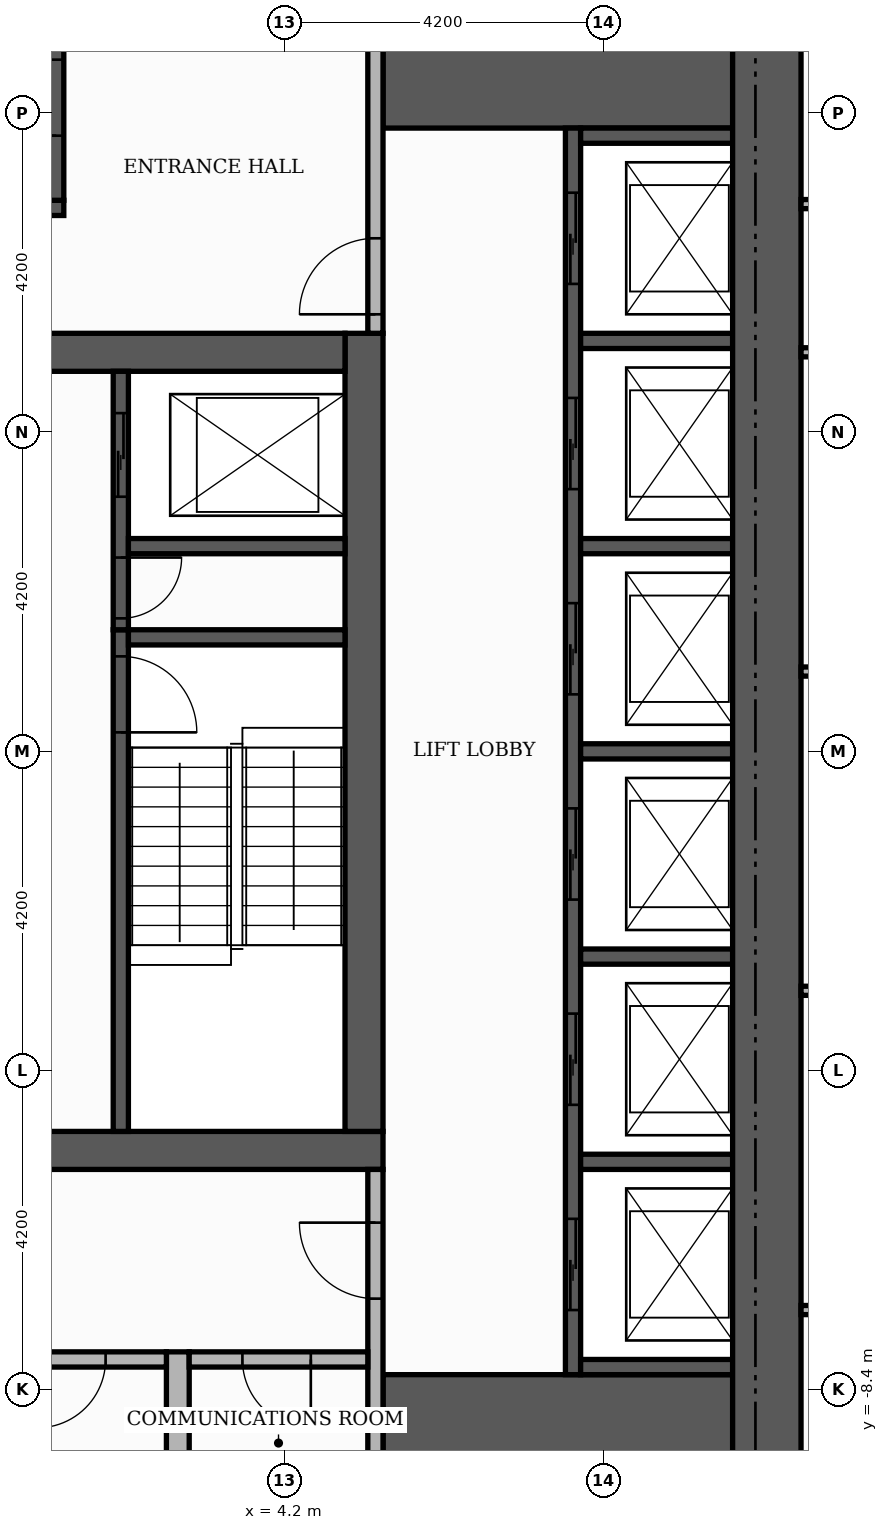
"""IFC4 building model, lengths in metres.
Left out: names, types, materials, properties, quantities, classifications, styles, units other than length and angle.
Written with IfcOpenShell. Run it as: python <this file> out.ifc"""

import sys

from ifc_helpers import new_model, si_unit, direction, frame, frame_2d, origin, place, context, subcontext, project, spatial, rectangle, extrude, element, fill, save


model = new_model("IFC4")
c1 = context("Model", 3, precision=1e-05, world=origin(), true_north=direction((0.0, 1.0)))
c2 = subcontext(c1, "Body", "Model", "MODEL_VIEW")
j1 = project(units=[si_unit("LENGTHUNIT", "METRE"), si_unit("PLANEANGLEUNIT", "RADIAN")], contexts=[c1])
p1 = place(None, origin())
s1 = spatial("IfcSite", under=j1, at=p1, CompositionType="ELEMENT")
p2 = place(p1, origin())
s2 = spatial("IfcBuilding", under=s1, at=p2, CompositionType="ELEMENT")
p3 = place(p2, frame((0.0, 0.0, 283.5)))
s3 = spatial("IfcBuildingStorey", under=s2, at=p3, CompositionType="ELEMENT", Elevation=283.5)
p4 = place(p3, frame((-5.5, -5.25, 0.0), z_axis=(0.0, 0.0, 1.0), x_axis=(1.0, 0.0, 0.0)))
e1 = element("IfcWall", 1, at=p4, inside=s3, PredefinedType="SHEAR", context=c2, shape_type="SweptSolid", body=[
    extrude(rectangle(XDim=11.0, YDim=0.5, at=frame_2d((5.5, 0.0))), origin(), (0.0, 0.0, 1.0), 3.4),
])
p5 = place(p4, frame((4.9, 0.0, 0.0)))
e2 = element("IfcOpeningElement", 2, at=p5, cuts=e1, PredefinedType="OPENING", context=c2, shape_type="SweptSolid", body=[
    extrude(rectangle(XDim=1.2, YDim=2.1, at=frame_2d((0.6, 1.05))), frame((0.0, 0.26, 0.0), z_axis=(0.0, -1.0, 0.0), x_axis=(1.0, 0.0, 0.0)), (0.0, 0.0, 1.0), 0.52),
])
p6 = place(p3, frame((5.25, -5.0, 0.0), z_axis=(0.0, 0.0, 1.0), x_axis=(0.0, 1.0, 0.0)))
e3 = element("IfcWall", 3, at=p6, inside=s3, PredefinedType="SHEAR", context=c2, shape_type="SweptSolid", body=[
    extrude(rectangle(XDim=10.5, YDim=0.5, at=frame_2d((5.25, 0.0))), origin(), (0.0, 0.0, 1.0), 3.4),
])
p7 = place(p3, frame((-5.0, 5.25, 0.0), z_axis=(0.0, 0.0, 1.0), x_axis=(1.0, 0.0, 0.0)))
e4 = element("IfcWall", 4, at=p7, inside=s3, PredefinedType="SHEAR", context=c2, shape_type="SweptSolid", body=[
    extrude(rectangle(XDim=10.0, YDim=0.5, at=frame_2d((5.0, 0.0))), origin(), (0.0, 0.0, 1.0), 3.4),
])
p8 = place(p7, frame((4.4, 0.0, 0.0)))
e5 = element("IfcOpeningElement", 5, at=p8, cuts=e4, PredefinedType="OPENING", context=c2, shape_type="SweptSolid", body=[
    extrude(rectangle(XDim=1.2, YDim=2.1, at=frame_2d((0.6, 1.05))), frame((0.0, 0.26, 0.0), z_axis=(0.0, -1.0, 0.0), x_axis=(1.0, 0.0, 0.0)), (0.0, 0.0, 1.0), 0.52),
])
for number, where, z_axis, x_axis in (
    (6, (5.5, -9.15, 0.0), (0.0, 0.0, 1.0), (1.0, 0.0, 0.0)),
    (7, (5.5, 9.15, 0.0), (0.0, 0.0, 1.0), (1.0, 0.0, 0.0)),
):
    element("IfcWall", number, at=place(p3, frame(where, z_axis=z_axis, x_axis=x_axis)), inside=s3, PredefinedType="SHEAR", context=c2, shape_type="SweptSolid", body=[
        extrude(rectangle(XDim=4.6, YDim=1.9, at=frame_2d((2.3, 0.0))), origin(), (0.0, 0.0, 1.0), 3.4),
    ])
p9 = place(p3, frame((2.05, -5.0, 0.0), z_axis=(0.0, 0.0, 1.0), x_axis=(0.0, 1.0, 0.0)))
e8 = element("IfcWall", 8, at=p9, inside=s3, PredefinedType="SHEAR", context=c2, shape_type="SweptSolid", body=[
    extrude(rectangle(XDim=6.6, YDim=0.2, at=frame_2d((3.3, 0.0))), origin(), (0.0, 0.0, 1.0), 3.4),
])
p10 = place(p9, frame((5.25, 0.0, 0.0)))
e9 = element("IfcOpeningElement", 9, at=p10, cuts=e8, PredefinedType="OPENING", context=c2, shape_type="SweptSolid", body=[
    extrude(rectangle(XDim=1.0, YDim=2.1, at=frame_2d((0.5, 1.05))), frame((0.0, 0.11, 0.0), z_axis=(0.0, -1.0, 0.0), x_axis=(1.0, 0.0, 0.0)), (0.0, 0.0, 1.0), 0.22),
])
p11 = place(p3, frame((2.15, 1.5, 0.0), z_axis=(0.0, 0.0, 1.0), x_axis=(1.0, 0.0, 0.0)))
e10 = element("IfcWall", 10, at=p11, inside=s3, PredefinedType="SHEAR", context=c2, shape_type="SweptSolid", body=[
    extrude(rectangle(XDim=2.85, YDim=0.2, at=frame_2d((1.425, 0.0))), origin(), (0.0, 0.0, 1.0), 3.4),
])
p12 = place(p3, frame((-5.5, 7.15, 0.0), z_axis=(0.0, 0.0, 1.0), x_axis=(1.0, 0.0, 0.0)))
e11 = element("IfcWall", 11, at=p12, inside=s3, PredefinedType="SHEAR", context=c2, shape_type="SweptSolid", body=[
    extrude(rectangle(XDim=6.8, YDim=0.2, at=frame_2d((3.4, 0.0))), origin(), (0.0, 0.0, 1.0), 3.4),
])
p13 = place(p3, frame((1.2, 7.25, 0.0), z_axis=(0.0, 0.0, 1.0), x_axis=(0.0, 1.0, 0.0)))
e12 = element("IfcWall", 12, at=p13, inside=s3, PredefinedType="SHEAR", context=c2, shape_type="SweptSolid", body=[
    extrude(rectangle(XDim=2.85, YDim=0.2, at=frame_2d((1.425, 0.0))), origin(), (0.0, 0.0, 1.0), 3.4),
])
p14 = place(p13, frame((0.85, 0.0, 0.0)))
e13 = element("IfcOpeningElement", 13, at=p14, cuts=e12, PredefinedType="OPENING", context=c2, shape_type="SweptSolid", body=[
    extrude(rectangle(XDim=1.0, YDim=2.1, at=frame_2d((0.5, 1.05))), frame((0.0, 0.11, 0.0), z_axis=(0.0, -1.0, 0.0), x_axis=(1.0, 0.0, 0.0)), (0.0, 0.0, 1.0), 0.22),
])
p15 = place(p3, frame((8.0, -8.2, 0.0), z_axis=(0.0, 0.0, 1.0), x_axis=(0.0, 1.0, 0.0)))
e14 = element("IfcWall", 14, at=p15, inside=s3, PredefinedType="SHEAR", context=c2, shape_type="SweptSolid", body=[
    extrude(rectangle(XDim=16.4, YDim=0.2, at=frame_2d((8.2, 0.0))), origin(), (0.0, 0.0, 1.0), 3.4),
])
p16 = place(p15, frame((0.85, 0.0, 0.0)))
e15 = element("IfcOpeningElement", 15, at=p16, cuts=e14, PredefinedType="OPENING", context=c2, shape_type="SweptSolid", body=[
    extrude(rectangle(XDim=1.2, YDim=2.1, at=frame_2d((0.6, 1.05))), frame((0.0, 0.11, 0.0), z_axis=(0.0, -1.0, 0.0), x_axis=(1.0, 0.0, 0.0)), (0.0, 0.0, 1.0), 0.22),
])
p17 = place(p15, frame((3.55, 0.0, 0.0)))
e16 = element("IfcOpeningElement", 16, at=p17, cuts=e14, PredefinedType="OPENING", context=c2, shape_type="SweptSolid", body=[
    extrude(rectangle(XDim=1.2, YDim=2.1, at=frame_2d((0.6, 1.05))), frame((0.0, 0.11, 0.0), z_axis=(0.0, -1.0, 0.0), x_axis=(1.0, 0.0, 0.0)), (0.0, 0.0, 1.0), 0.22),
])
p18 = place(p15, frame((6.25, 0.0, 0.0)))
e17 = element("IfcOpeningElement", 17, at=p18, cuts=e14, PredefinedType="OPENING", context=c2, shape_type="SweptSolid", body=[
    extrude(rectangle(XDim=1.2, YDim=2.1, at=frame_2d((0.6, 1.05))), frame((0.0, 0.11, 0.0), z_axis=(0.0, -1.0, 0.0), x_axis=(1.0, 0.0, 0.0)), (0.0, 0.0, 1.0), 0.22),
])
p19 = place(p15, frame((8.95, 0.0, 0.0)))
e18 = element("IfcOpeningElement", 18, at=p19, cuts=e14, PredefinedType="OPENING", context=c2, shape_type="SweptSolid", body=[
    extrude(rectangle(XDim=1.2, YDim=2.1, at=frame_2d((0.6, 1.05))), frame((0.0, 0.11, 0.0), z_axis=(0.0, -1.0, 0.0), x_axis=(1.0, 0.0, 0.0)), (0.0, 0.0, 1.0), 0.22),
])
p20 = place(p15, frame((11.65, 0.0, 0.0)))
e19 = element("IfcOpeningElement", 19, at=p20, cuts=e14, PredefinedType="OPENING", context=c2, shape_type="SweptSolid", body=[
    extrude(rectangle(XDim=1.2, YDim=2.1, at=frame_2d((0.6, 1.05))), frame((0.0, 0.11, 0.0), z_axis=(0.0, -1.0, 0.0), x_axis=(1.0, 0.0, 0.0)), (0.0, 0.0, 1.0), 0.22),
])
p21 = place(p15, frame((14.35, 0.0, 0.0)))
e20 = element("IfcOpeningElement", 20, at=p21, cuts=e14, PredefinedType="OPENING", context=c2, shape_type="SweptSolid", body=[
    extrude(rectangle(XDim=1.2, YDim=2.1, at=frame_2d((0.6, 1.05))), frame((0.0, 0.11, 0.0), z_axis=(0.0, -1.0, 0.0), x_axis=(1.0, 0.0, 0.0)), (0.0, 0.0, 1.0), 0.22),
])
for number, where, z_axis, x_axis in (
    (21, (8.1, -8.1, 0.0), (0.0, 0.0, 1.0), (1.0, 0.0, 0.0)),
    (22, (8.1, -5.4, 0.0), (0.0, 0.0, 1.0), (1.0, 0.0, 0.0)),
    (23, (8.1, -2.7, 0.0), (0.0, 0.0, 1.0), (1.0, 0.0, 0.0)),
    (24, (8.1, 0.0, 0.0), (0.0, 0.0, 1.0), (1.0, 0.0, 0.0)),
):
    element("IfcWall", number, at=place(p3, frame(where, z_axis=z_axis, x_axis=x_axis)), inside=s3, PredefinedType="SHEAR", context=c2, shape_type="SweptSolid", body=[
        extrude(rectangle(XDim=2.0, YDim=0.2, at=frame_2d((1.0, 0.0))), origin(), (0.0, 0.0, 1.0), 3.4),
    ])
p22 = place(p3, frame((2.05, 1.6, 0.0), z_axis=(0.0, 0.0, 1.0), x_axis=(0.0, 1.0, 0.0)))
e25 = element("IfcWall", 25, at=p22, inside=s3, PredefinedType="SHEAR", context=c2, shape_type="SweptSolid", body=[
    extrude(rectangle(XDim=3.4, YDim=0.2, at=frame_2d((1.7, 0.0))), origin(), (0.0, 0.0, 1.0), 3.4),
])
p23 = place(p22, frame((1.75, 0.0, 0.0)))
e26 = element("IfcOpeningElement", 26, at=p23, cuts=e25, PredefinedType="OPENING", context=c2, shape_type="SweptSolid", body=[
    extrude(rectangle(XDim=1.1, YDim=2.1, at=frame_2d((0.55, 1.05))), frame((0.0, 0.11, 0.0), z_axis=(0.0, -1.0, 0.0), x_axis=(1.0, 0.0, 0.0)), (0.0, 0.0, 1.0), 0.22),
])
p24 = place(p22, frame((0.15, 0.0, 0.0)))
e27 = element("IfcOpeningElement", 27, at=p24, cuts=e25, PredefinedType="OPENING", context=c2, shape_type="SweptSolid", body=[
    extrude(rectangle(XDim=0.8, YDim=2.1, at=frame_2d((0.4, 1.05))), frame((0.0, 0.11, 0.0), z_axis=(0.0, -1.0, 0.0), x_axis=(1.0, 0.0, 0.0)), (0.0, 0.0, 1.0), 0.22),
])
p25 = place(p3, frame((2.15, 2.7, 0.0), z_axis=(0.0, 0.0, 1.0), x_axis=(1.0, 0.0, 0.0)))
e28 = element("IfcWall", 28, at=p25, inside=s3, PredefinedType="SHEAR", context=c2, shape_type="SweptSolid", body=[
    extrude(rectangle(XDim=2.85, YDim=0.2, at=frame_2d((1.425, 0.0))), origin(), (0.0, 0.0, 1.0), 3.4),
])
for number, where, z_axis, x_axis in (
    (29, (8.1, 2.7, 0.0), (0.0, 0.0, 1.0), (1.0, 0.0, 0.0)),
    (30, (8.1, 5.4, 0.0), (0.0, 0.0, 1.0), (1.0, 0.0, 0.0)),
    (31, (8.1, 8.1, 0.0), (0.0, 0.0, 1.0), (1.0, 0.0, 0.0)),
):
    element("IfcWall", number, at=place(p3, frame(where, z_axis=z_axis, x_axis=x_axis)), inside=s3, PredefinedType="SHEAR", context=c2, shape_type="SweptSolid", body=[
        extrude(rectangle(XDim=2.0, YDim=0.2, at=frame_2d((1.0, 0.0))), origin(), (0.0, 0.0, 1.0), 3.4),
    ])
p26 = place(p3, frame((10.55, -10.1, 0.0), z_axis=(0.0, 0.0, 1.0), x_axis=(0.0, 1.0, 0.0)))
e32 = element("IfcWall", 32, at=p26, inside=s3, PredefinedType="SHEAR", context=c2, shape_type="SweptSolid", body=[
    extrude(rectangle(XDim=20.2, YDim=0.9, at=frame_2d((10.1, 0.0))), origin(), (0.0, 0.0, 1.0), 3.4),
])
p27 = place(p3, frame((2.8, -10.1, 0.0), z_axis=(0.0, 0.0, 1.0), x_axis=(0.0, 1.0, 0.0)))
e33 = element("IfcWall", 33, at=p27, inside=s3, PredefinedType="PARTITIONING", context=c2, shape_type="SweptSolid", body=[
    extrude(rectangle(XDim=2.2, YDim=0.3, at=frame_2d((1.1, 0.0))), origin(), (0.0, 0.0, 1.0), 3.4),
])
p28 = place(p3, frame((5.4, -10.1, 0.0), z_axis=(0.0, 0.0, 1.0), x_axis=(0.0, 1.0, 0.0)))
e34 = element("IfcWall", 34, at=p28, inside=s3, PredefinedType="PARTITIONING", context=c2, shape_type="SweptSolid", body=[
    extrude(rectangle(XDim=4.6, YDim=0.2, at=frame_2d((2.3, 0.0))), origin(), (0.0, 0.0, 1.0), 3.4),
])
p29 = place(p28, frame((2.9, 0.0, 0.0)))
e35 = element("IfcOpeningElement", 35, at=p29, cuts=e34, PredefinedType="OPENING", context=c2, shape_type="SweptSolid", body=[
    extrude(rectangle(XDim=1.0, YDim=2.1, at=frame_2d((0.5, 1.05))), frame((0.0, 0.11, 0.0), z_axis=(0.0, -1.0, 0.0), x_axis=(1.0, 0.0, 0.0)), (0.0, 0.0, 1.0), 0.22),
])
p30 = place(p3, frame((0.1, -8.0, 0.0), z_axis=(0.0, 0.0, 1.0), x_axis=(1.0, 0.0, 0.0)))
e36 = element("IfcWall", 36, at=p30, inside=s3, PredefinedType="PARTITIONING", context=c2, shape_type="SweptSolid", body=[
    extrude(rectangle(XDim=2.55, YDim=0.2, at=frame_2d((1.275, 0.0))), origin(), (0.0, 0.0, 1.0), 3.4),
])
p31 = place(p30, frame((0.85, 0.0, 0.0)))
e37 = element("IfcOpeningElement", 37, at=p31, cuts=e36, PredefinedType="OPENING", context=c2, shape_type="SweptSolid", body=[
    extrude(rectangle(XDim=0.9, YDim=2.1, at=frame_2d((0.45, 1.05))), frame((0.0, 0.11, 0.0), z_axis=(0.0, -1.0, 0.0), x_axis=(1.0, 0.0, 0.0)), (0.0, 0.0, 1.0), 0.22),
])
p32 = place(p3, frame((2.95, -8.0, 0.0), z_axis=(0.0, 0.0, 1.0), x_axis=(1.0, 0.0, 0.0)))
e38 = element("IfcWall", 38, at=p32, inside=s3, PredefinedType="PARTITIONING", context=c2, shape_type="SweptSolid", body=[
    extrude(rectangle(XDim=2.35, YDim=0.2, at=frame_2d((1.175, 0.0))), origin(), (0.0, 0.0, 1.0), 3.4),
])
p33 = place(p32, frame((0.7, 0.0, 0.0)))
e39 = element("IfcOpeningElement", 39, at=p33, cuts=e38, PredefinedType="OPENING", context=c2, shape_type="SweptSolid", body=[
    extrude(rectangle(XDim=0.9, YDim=2.1, at=frame_2d((0.45, 1.05))), frame((0.0, 0.11, 0.0), z_axis=(0.0, -1.0, 0.0), x_axis=(1.0, 0.0, 0.0)), (0.0, 0.0, 1.0), 0.22),
])
p34 = place(p3, frame((5.4, 5.5, 0.0), z_axis=(0.0, 0.0, 1.0), x_axis=(0.0, 1.0, 0.0)))
e40 = element("IfcWall", 40, at=p34, inside=s3, PredefinedType="PARTITIONING", context=c2, shape_type="SweptSolid", body=[
    extrude(rectangle(XDim=4.6, YDim=0.2, at=frame_2d((2.3, 0.0))), origin(), (0.0, 0.0, 1.0), 3.4),
])
p35 = place(p34, frame((0.25, 0.0, 0.0)))
e41 = element("IfcOpeningElement", 41, at=p35, cuts=e40, PredefinedType="OPENING", context=c2, shape_type="SweptSolid", body=[
    extrude(rectangle(XDim=1.0, YDim=2.1, at=frame_2d((0.5, 1.05))), frame((0.0, 0.11, 0.0), z_axis=(0.0, -1.0, 0.0), x_axis=(1.0, 0.0, 0.0)), (0.0, 0.0, 1.0), 0.22),
])
p36 = place(p3, frame((11.0, -7.35, 0.0), z_axis=(0.0, 0.0, 1.0), x_axis=(1.0, 0.0, 0.0)))
e42 = element("IfcWall", 42, at=p36, inside=s3, PredefinedType="PARTITIONING", context=c2, shape_type="SweptSolid", body=[
    extrude(rectangle(XDim=7.92, YDim=0.12, at=frame_2d((3.96, 0.0))), origin(), (0.0, 0.0, 1.0), 3.4),
])
p37 = place(p36, frame((3.51, 0.0, 0.0)))
e43 = element("IfcOpeningElement", 43, at=p37, cuts=e42, PredefinedType="OPENING", context=c2, shape_type="SweptSolid", body=[
    extrude(rectangle(XDim=0.9, YDim=2.1, at=frame_2d((0.45, 1.05))), frame((0.0, 0.07, 0.0), z_axis=(0.0, -1.0, 0.0), x_axis=(1.0, 0.0, 0.0)), (0.0, 0.0, 1.0), 0.14),
])
for number, where, z_axis, x_axis in (
    (44, (11.0, -3.15, 0.0), (0.0, 0.0, 1.0), (1.0, 0.0, 0.0)),
    (45, (11.0, 1.05, 0.0), (0.0, 0.0, 1.0), (1.0, 0.0, 0.0)),
    (46, (11.0, 5.25, 0.0), (0.0, 0.0, 1.0), (1.0, 0.0, 0.0)),
    (47, (11.0, 7.2, 0.0), (0.0, 0.0, 1.0), (1.0, 0.0, 0.0)),
):
    element("IfcWall", number, at=place(p3, frame(where, z_axis=z_axis, x_axis=x_axis)), inside=s3, PredefinedType="PARTITIONING", context=c2, shape_type="SweptSolid", body=[
        extrude(rectangle(XDim=7.92, YDim=0.12, at=frame_2d((3.96, 0.0))), origin(), (0.0, 0.0, 1.0), 3.4),
    ])
p38 = place(p16, origin())
e48 = element("IfcDoor", 48, at=p38, inside=s3, OperationType="SLIDING_TO_LEFT", PredefinedType="DOOR", context=c2, shape_type="SweptSolid", body=[
    extrude(rectangle(XDim=1.2, YDim=2.1, at=frame_2d((0.6, 1.05))), frame((0.0, 0.025, 0.0), z_axis=(0.0, -1.0, 0.0), x_axis=(1.0, 0.0, 0.0)), (0.0, 0.0, 1.0), 0.05),
])
fill(e15, e48)
p39 = place(p17, origin())
e49 = element("IfcDoor", 49, at=p39, inside=s3, OperationType="SLIDING_TO_LEFT", PredefinedType="DOOR", context=c2, shape_type="SweptSolid", body=[
    extrude(rectangle(XDim=1.2, YDim=2.1, at=frame_2d((0.6, 1.05))), frame((0.0, 0.025, 0.0), z_axis=(0.0, -1.0, 0.0), x_axis=(1.0, 0.0, 0.0)), (0.0, 0.0, 1.0), 0.05),
])
fill(e16, e49)
p40 = place(p18, origin())
e50 = element("IfcDoor", 50, at=p40, inside=s3, OperationType="SLIDING_TO_LEFT", PredefinedType="DOOR", context=c2, shape_type="SweptSolid", body=[
    extrude(rectangle(XDim=1.2, YDim=2.1, at=frame_2d((0.6, 1.05))), frame((0.0, 0.025, 0.0), z_axis=(0.0, -1.0, 0.0), x_axis=(1.0, 0.0, 0.0)), (0.0, 0.0, 1.0), 0.05),
])
fill(e17, e50)
p41 = place(p19, origin())
e51 = element("IfcDoor", 51, at=p41, inside=s3, OperationType="SLIDING_TO_LEFT", PredefinedType="DOOR", context=c2, shape_type="SweptSolid", body=[
    extrude(rectangle(XDim=1.2, YDim=2.1, at=frame_2d((0.6, 1.05))), frame((0.0, 0.025, 0.0), z_axis=(0.0, -1.0, 0.0), x_axis=(1.0, 0.0, 0.0)), (0.0, 0.0, 1.0), 0.05),
])
fill(e18, e51)
p42 = place(p20, origin())
e52 = element("IfcDoor", 52, at=p42, inside=s3, OperationType="SLIDING_TO_LEFT", PredefinedType="DOOR", context=c2, shape_type="SweptSolid", body=[
    extrude(rectangle(XDim=1.2, YDim=2.1, at=frame_2d((0.6, 1.05))), frame((0.0, 0.025, 0.0), z_axis=(0.0, -1.0, 0.0), x_axis=(1.0, 0.0, 0.0)), (0.0, 0.0, 1.0), 0.05),
])
fill(e19, e52)
p43 = place(p21, origin())
e53 = element("IfcDoor", 53, at=p43, inside=s3, OperationType="SLIDING_TO_LEFT", PredefinedType="DOOR", context=c2, shape_type="SweptSolid", body=[
    extrude(rectangle(XDim=1.2, YDim=2.1, at=frame_2d((0.6, 1.05))), frame((0.0, 0.025, 0.0), z_axis=(0.0, -1.0, 0.0), x_axis=(1.0, 0.0, 0.0)), (0.0, 0.0, 1.0), 0.05),
])
fill(e20, e53)
p44 = place(p23, origin())
e54 = element("IfcDoor", 54, at=p44, inside=s3, OperationType="SLIDING_TO_LEFT", PredefinedType="DOOR", context=c2, shape_type="SweptSolid", body=[
    extrude(rectangle(XDim=1.1, YDim=2.1, at=frame_2d((0.55, 1.05))), frame((0.0, 0.025, 0.0), z_axis=(0.0, -1.0, 0.0), x_axis=(1.0, 0.0, 0.0)), (0.0, 0.0, 1.0), 0.05),
])
fill(e26, e54)
p45 = place(p10, frame((1.0, 0.0, 0.0), z_axis=(0.0, 0.0, 1.0), x_axis=(-1.0, 0.0, 0.0)))
e55 = element("IfcDoor", 55, at=p45, inside=s3, OperationType="SINGLE_SWING_LEFT", PredefinedType="DOOR", context=c2, shape_type="SweptSolid", body=[
    extrude(rectangle(XDim=1.0, YDim=2.1, at=frame_2d((0.5, 1.05))), frame((0.0, 0.025, 0.0), z_axis=(0.0, -1.0, 0.0), x_axis=(1.0, 0.0, 0.0)), (0.0, 0.0, 1.0), 0.05),
])
fill(e9, e55)
p46 = place(p24, frame((0.8, 0.0, 0.0), z_axis=(0.0, 0.0, 1.0), x_axis=(-1.0, 0.0, 0.0)))
e56 = element("IfcDoor", 56, at=p46, inside=s3, OperationType="SINGLE_SWING_RIGHT", PredefinedType="DOOR", context=c2, shape_type="SweptSolid", body=[
    extrude(rectangle(XDim=0.8, YDim=2.1, at=frame_2d((0.4, 1.05))), frame((0.0, 0.025, 0.0), z_axis=(0.0, -1.0, 0.0), x_axis=(1.0, 0.0, 0.0)), (0.0, 0.0, 1.0), 0.05),
])
fill(e27, e56)
p47 = place(p14, origin())
e57 = element("IfcDoor", 57, at=p47, inside=s3, OperationType="SINGLE_SWING_LEFT", PredefinedType="DOOR", context=c2, shape_type="SweptSolid", body=[
    extrude(rectangle(XDim=1.0, YDim=2.1, at=frame_2d((0.5, 1.05))), frame((0.0, 0.025, 0.0), z_axis=(0.0, -1.0, 0.0), x_axis=(1.0, 0.0, 0.0)), (0.0, 0.0, 1.0), 0.05),
])
fill(e13, e57)
p48 = place(p35, origin())
e58 = element("IfcDoor", 58, at=p48, inside=s3, OperationType="SINGLE_SWING_LEFT", PredefinedType="DOOR", context=c2, shape_type="SweptSolid", body=[
    extrude(rectangle(XDim=1.0, YDim=2.1, at=frame_2d((0.5, 1.05))), frame((0.0, 0.025, 0.0), z_axis=(0.0, -1.0, 0.0), x_axis=(1.0, 0.0, 0.0)), (0.0, 0.0, 1.0), 0.05),
])
fill(e41, e58)
p49 = place(p29, origin())
e59 = element("IfcDoor", 59, at=p49, inside=s3, OperationType="SINGLE_SWING_RIGHT", PredefinedType="DOOR", context=c2, shape_type="SweptSolid", body=[
    extrude(rectangle(XDim=1.0, YDim=2.1, at=frame_2d((0.5, 1.05))), frame((0.0, 0.025, 0.0), z_axis=(0.0, -1.0, 0.0), x_axis=(1.0, 0.0, 0.0)), (0.0, 0.0, 1.0), 0.05),
])
fill(e35, e59)
p50 = place(p31, frame((0.9, 0.0, 0.0), z_axis=(0.0, 0.0, 1.0), x_axis=(-1.0, 0.0, 0.0)))
e60 = element("IfcDoor", 60, at=p50, inside=s3, OperationType="SINGLE_SWING_LEFT", PredefinedType="DOOR", context=c2, shape_type="SweptSolid", body=[
    extrude(rectangle(XDim=0.9, YDim=2.1, at=frame_2d((0.45, 1.05))), frame((0.0, 0.025, 0.0), z_axis=(0.0, -1.0, 0.0), x_axis=(1.0, 0.0, 0.0)), (0.0, 0.0, 1.0), 0.05),
])
fill(e37, e60)
p51 = place(p33, frame((0.9, 0.0, 0.0), z_axis=(0.0, 0.0, 1.0), x_axis=(-1.0, 0.0, 0.0)))
e61 = element("IfcDoor", 61, at=p51, inside=s3, OperationType="SINGLE_SWING_RIGHT", PredefinedType="DOOR", context=c2, shape_type="SweptSolid", body=[
    extrude(rectangle(XDim=0.9, YDim=2.1, at=frame_2d((0.45, 1.05))), frame((0.0, 0.025, 0.0), z_axis=(0.0, -1.0, 0.0), x_axis=(1.0, 0.0, 0.0)), (0.0, 0.0, 1.0), 0.05),
])
fill(e39, e61)
save(model, sys.argv[1])
